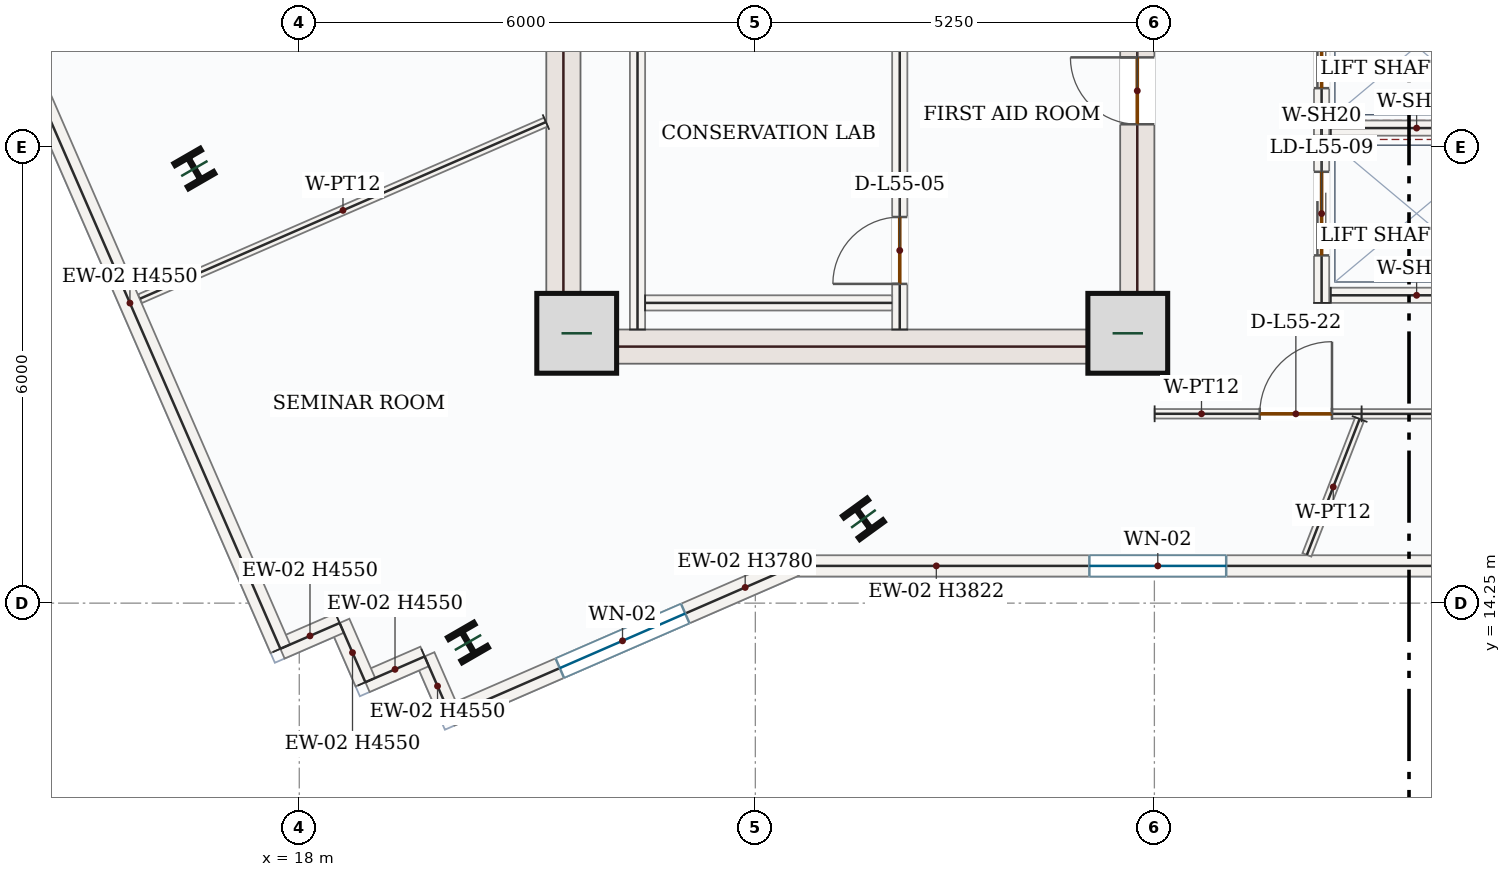
"""IFC4 building model, lengths in metres.
Left out: names, types, materials, properties, quantities, classifications, styles, units other than length and angle.
Written with IfcOpenShell. Run it as: python <this file> out.ifc"""

import sys

from ifc_helpers import new_model, si_unit, direction, frame, frame_2d, origin, origin_2d, place, context, subcontext, project, spatial, rectangle, i_section, extrude, source, transform, mapped, element, fill, save


model = new_model("IFC4")
c1 = context("Model", 3, precision=1e-05, world=origin(), true_north=direction((0.0, 1.0)))
c2 = subcontext(c1, "Body", "Model", "MODEL_VIEW")
j1 = project(units=[si_unit("LENGTHUNIT", "METRE"), si_unit("PLANEANGLEUNIT", "RADIAN")], contexts=[c1])
p1 = place(None, origin())
s1 = spatial("IfcSite", under=j1, at=p1, CompositionType="ELEMENT")
p2 = place(p1, origin())
s2 = spatial("IfcBuilding", under=s1, at=p2, CompositionType="ELEMENT")
p3 = place(p2, frame((0.0, 0.0, 234.3)))
s3 = spatial("IfcBuildingStorey", under=s2, at=p3, CompositionType="ELEMENT", Elevation=234.3)
m1 = source(origin(), c2, "Body", "SweptSolid", [
    extrude(rectangle(XDim=8.55, YDim=0.45, at=frame_2d((4.275, 0.0))), origin(), (0.0, 0.0, 1.0), 4.55),
])
p4 = place(p3, frame((21.475, 17.4, 0.0), z_axis=(0.0, 0.0, 1.0), x_axis=(0.0, 1.0, 0.0)))
e1 = element("IfcWall", 1, at=p4, inside=s3, PredefinedType="SHEAR", context=c2, shape_type="MappedRepresentation", body=[
    mapped(m1, transform((0.0, 0.0, 0.0), x_axis=(1.0, 0.0, 0.0), y_axis=(0.0, 1.0, 0.0), z_axis=(0.0, 0.0, 1.0), scale=1.0)),
])
p5 = place(p3, frame((29.025, 17.4, 0.0), z_axis=(0.0, 0.0, 1.0), x_axis=(0.0, 1.0, 0.0)))
e2 = element("IfcWall", 2, at=p5, inside=s3, PredefinedType="SHEAR", context=c2, shape_type="SweptSolid", body=[
    extrude(rectangle(XDim=8.55, YDim=0.45, at=frame_2d((4.275, 0.0))), origin(), (0.0, 0.0, 1.0), 4.55),
])
p6 = place(p5, frame((6.65, 0.0, 0.0)))
e3 = element("IfcOpeningElement", 3, at=p6, cuts=e2, PredefinedType="OPENING", context=c2, shape_type="SweptSolid", body=[
    extrude(rectangle(XDim=1.1, YDim=2.2, at=frame_2d((0.55, 1.1))), frame((0.0, 0.235, 0.0), z_axis=(0.0, -1.0, 0.0), x_axis=(1.0, 0.0, 0.0)), (0.0, 0.0, 1.0), 0.47),
])
p7 = place(p5, frame((3.15, 0.0, 0.0)))
e4 = element("IfcOpeningElement", 4, at=p7, cuts=e2, PredefinedType="OPENING", context=c2, shape_type="SweptSolid", body=[
    extrude(rectangle(XDim=0.88, YDim=2.1, at=frame_2d((0.44, 1.05))), frame((0.0, 0.235, 0.0), z_axis=(0.0, -1.0, 0.0), x_axis=(1.0, 0.0, 0.0)), (0.0, 0.0, 1.0), 0.47),
])
m2 = source(origin(), c2, "Body", "SweptSolid", [
    extrude(rectangle(XDim=7.1, YDim=0.45, at=frame_2d((3.55, 0.0))), origin(), (0.0, 0.0, 1.0), 4.55),
])
p8 = place(p3, frame((21.7, 17.625, 0.0), z_axis=(0.0, 0.0, 1.0), x_axis=(1.0, 0.0, 0.0)))
e5 = element("IfcWall", 5, at=p8, inside=s3, PredefinedType="SHEAR", context=c2, shape_type="MappedRepresentation", body=[
    mapped(m2, transform((0.0, 0.0, 0.0), x_axis=(1.0, 0.0, 0.0), y_axis=(0.0, 1.0, 0.0), z_axis=(0.0, 0.0, 1.0), scale=1.0)),
])
m3 = source(origin(), c2, "Body", "SweptSolid", [
    extrude(rectangle(XDim=1.05, YDim=1.05, at=origin_2d()), origin(), (0.0, 0.0, 1.0), 4.8),
])
for number, where, z_axis, x_axis in (
    (6, (21.65, 17.8, 0.0), (0.0, 0.0, 1.0), (1.0, 0.0, 0.0)),
    (7, (28.9, 17.8, 0.0), (0.0, 0.0, 1.0), (1.0, 0.0, 0.0)),
):
    element("IfcColumn", number, at=place(p3, frame(where, z_axis=z_axis, x_axis=x_axis)), inside=s3, PredefinedType="COLUMN", context=c2, shape_type="MappedRepresentation", body=[
        mapped(m3, transform((0.0, 0.0, 0.0), x_axis=(1.0, 0.0, 0.0), y_axis=(0.0, 1.0, 0.0), z_axis=(0.0, 0.0, 1.0), scale=1.0)),
    ])
m4 = source(origin(), c2, "Body", "SweptSolid", [
    extrude(i_section(OverallWidth=0.399, OverallDepth=0.386, WebThickness=0.021, FlangeThickness=0.033, FilletRadius=0.018, at=origin_2d()), origin(), (0.0, 0.0, 1.0), 4.8),
])
for number, where, z_axis, x_axis in (
    (8, (25.422, 15.359, 0.0), (0.0, 0.0, 1.0), (0.809, 0.588, 0.0)),
    (9, (16.62, 19.968, 0.0), (0.0, 0.0, 1.0), (0.866, 0.5, 0.0)),
    (10, (20.22, 13.732, 0.0), (0.0, 0.0, 1.0), (0.866, 0.5, 0.0)),
):
    element("IfcColumn", number, at=place(p3, frame(where, z_axis=z_axis, x_axis=x_axis)), inside=s3, PredefinedType="COLUMN", context=c2, shape_type="MappedRepresentation", body=[
        mapped(m4, transform((0.0, 0.0, 0.0), x_axis=(1.0, 0.0, 0.0), y_axis=(0.0, 1.0, 0.0), z_axis=(0.0, 0.0, 1.0), scale=1.0)),
    ])
p9 = place(p3, frame((34.072, 14.74, 0.0), z_axis=(0.0, 0.0, 1.0), x_axis=(-1.0, 0.0, 0.0)))
e11 = element("IfcWall", 11, at=p9, inside=s3, PredefinedType="SOLIDWALL", context=c2, shape_type="SweptSolid", body=[
    extrude(rectangle(XDim=9.554, YDim=0.28, at=frame_2d((4.777, 0.0))), origin(), (0.0, 0.0, 1.0), 3.822),
])
p10 = place(p9, frame((3.877, 0.0, 0.85)))
e12 = element("IfcOpeningElement", 12, at=p10, cuts=e11, PredefinedType="OPENING", context=c2, shape_type="SweptSolid", body=[
    extrude(rectangle(XDim=1.8, YDim=1.75, at=frame_2d((0.9, 0.875))), frame((0.0, 0.15, 0.0), z_axis=(0.0, -1.0, 0.0), x_axis=(1.0, 0.0, 0.0)), (0.0, 0.0, 1.0), 0.3),
])
p11 = place(p3, frame((24.518, 14.74, 0.0), z_axis=(0.0, 0.0, 1.0), x_axis=(-0.916937202251, -0.399031536509, 0.0)))
e13 = element("IfcWall", 13, at=p11, inside=s3, PredefinedType="SOLIDWALL", context=c2, shape_type="SweptSolid", body=[
    extrude(rectangle(XDim=4.939, YDim=0.28, at=frame_2d((2.47, 0.0))), origin(), (0.0, 0.0, 1.0), 3.78),
])
p12 = place(p11, frame((1.57, 0.0, 0.85)))
e14 = element("IfcOpeningElement", 14, at=p12, cuts=e13, PredefinedType="OPENING", context=c2, shape_type="SweptSolid", body=[
    extrude(rectangle(XDim=1.8, YDim=1.75, at=frame_2d((0.9, 0.875))), frame((0.0, 0.15, 0.0), z_axis=(0.0, -1.0, 0.0), x_axis=(1.0, 0.0, 0.0)), (0.0, 0.0, 1.0), 0.3),
])
m5 = source(origin(), c2, "Body", "SweptSolid", [
    extrude(rectangle(XDim=0.85, YDim=0.28, at=frame_2d((0.425, 0.0))), origin(), (0.0, 0.0, 1.0), 4.55),
])
for number, where, z_axis, x_axis in (
    (15, (19.989, 12.769, 0.0), (0.0, 0.0, 1.0), (-0.399, 0.917, 0.0)),
    (16, (19.649, 13.549, 0.0), (0.0, 0.0, 1.0), (-0.917, -0.399, 0.0)),
):
    element("IfcWall", number, at=place(p3, frame(where, z_axis=z_axis, x_axis=x_axis)), inside=s3, PredefinedType="SOLIDWALL", context=c2, shape_type="MappedRepresentation", body=[
        mapped(m5, transform((0.0, 0.0, 0.0), x_axis=(1.0, 0.0, 0.0), y_axis=(0.0, 1.0, 0.0), z_axis=(0.0, 0.0, 1.0), scale=1.0)),
    ])
m6 = source(origin(), c2, "Body", "SweptSolid", [
    extrude(rectangle(XDim=0.85, YDim=0.28, at=frame_2d((0.425, 0.0))), origin(), (0.0, 0.0, 1.0), 4.55),
])
p13 = place(p3, frame((18.87, 13.209, 0.0), z_axis=(0.0, 0.0, 1.0), x_axis=(-0.399009702756, 0.916946703526, 0.0)))
e17 = element("IfcWall", 17, at=p13, inside=s3, PredefinedType="SOLIDWALL", context=c2, shape_type="MappedRepresentation", body=[
    mapped(m6, transform((0.0, 0.0, 0.0), x_axis=(1.0, 0.0, 0.0), y_axis=(0.0, 1.0, 0.0), z_axis=(0.0, 0.0, 1.0), scale=1.0)),
])
p14 = place(p3, frame((18.531, 13.989, 0.0), z_axis=(0.0, 0.0, 1.0), x_axis=(-0.916992420403, -0.398904626351, 0.0)))
e18 = element("IfcWall", 18, at=p14, inside=s3, PredefinedType="SOLIDWALL", context=c2, shape_type="MappedRepresentation", body=[
    mapped(m5, transform((0.0, 0.0, 0.0), x_axis=(1.0, 0.0, 0.0), y_axis=(0.0, 1.0, 0.0), z_axis=(0.0, 0.0, 1.0), scale=1.0)),
])
m7 = source(origin(), c2, "Body", "SweptSolid", [
    extrude(rectangle(XDim=9.92, YDim=0.28, at=frame_2d((4.96, 0.0))), origin(), (0.0, 0.0, 1.0), 4.55),
])
p15 = place(p3, frame((17.751, 13.65, 0.0), z_axis=(0.0, 0.0, 1.0), x_axis=(-0.398992471769, 0.916954201404, 0.0)))
e19 = element("IfcWall", 19, at=p15, inside=s3, PredefinedType="SOLIDWALL", context=c2, shape_type="MappedRepresentation", body=[
    mapped(m7, transform((0.0, 0.0, 0.0), x_axis=(1.0, 0.0, 0.0), y_axis=(0.0, 1.0, 0.0), z_axis=(0.0, 0.0, 1.0), scale=1.0)),
])
m8 = source(origin(), c2, "Body", "SweptSolid", [
    extrude(rectangle(XDim=7.87, YDim=0.2, at=frame_2d((3.935, 0.0))), origin(), (0.0, 0.0, 1.0), 4.55),
])
p16 = place(p3, frame((22.45, 17.85, 0.0), z_axis=(0.0, 0.0, 1.0), x_axis=(0.0, 1.0, 0.0)))
e20 = element("IfcWall", 20, at=p16, inside=s3, PredefinedType="SOLIDWALL", context=c2, shape_type="MappedRepresentation", body=[
    mapped(m8, transform((0.0, 0.0, 0.0), x_axis=(1.0, 0.0, 0.0), y_axis=(0.0, 1.0, 0.0), z_axis=(0.0, 0.0, 1.0), scale=1.0)),
])
p17 = place(p3, frame((25.9, 17.85, 0.0), z_axis=(0.0, 0.0, 1.0), x_axis=(0.0, 1.0, 0.0)))
e21 = element("IfcWall", 21, at=p17, inside=s3, PredefinedType="SOLIDWALL", context=c2, shape_type="SweptSolid", body=[
    extrude(rectangle(XDim=8.0, YDim=0.2, at=frame_2d((4.0, 0.0))), origin(), (0.0, 0.0, 1.0), 4.55),
])
p18 = place(p17, frame((6.2, 0.0, 0.0)))
e22 = element("IfcOpeningElement", 22, at=p18, cuts=e21, PredefinedType="OPENING", context=c2, shape_type="SweptSolid", body=[
    extrude(rectangle(XDim=1.0, YDim=2.15, at=frame_2d((0.5, 1.075))), frame((0.0, 0.11, 0.0), z_axis=(0.0, -1.0, 0.0), x_axis=(1.0, 0.0, 0.0)), (0.0, 0.0, 1.0), 0.22),
])
p19 = place(p17, frame((0.6, 0.0, 0.0)))
e23 = element("IfcOpeningElement", 23, at=p19, cuts=e21, PredefinedType="OPENING", context=c2, shape_type="SweptSolid", body=[
    extrude(rectangle(XDim=0.88, YDim=2.1, at=frame_2d((0.44, 1.05))), frame((0.0, 0.11, 0.0), z_axis=(0.0, -1.0, 0.0), x_axis=(1.0, 0.0, 0.0)), (0.0, 0.0, 1.0), 0.22),
])
m9 = source(origin(), c2, "Body", "SweptSolid", [
    extrude(rectangle(XDim=3.25, YDim=0.2, at=frame_2d((1.625, 0.0))), origin(), (0.0, 0.0, 1.0), 4.55),
])
p20 = place(p3, frame((22.55, 18.2, 0.0), z_axis=(0.0, 0.0, 1.0), x_axis=(1.0, 0.0, 0.0)))
e24 = element("IfcWall", 24, at=p20, inside=s3, PredefinedType="SOLIDWALL", context=c2, shape_type="MappedRepresentation", body=[
    mapped(m9, transform((0.0, 0.0, 0.0), x_axis=(1.0, 0.0, 0.0), y_axis=(0.0, 1.0, 0.0), z_axis=(0.0, 0.0, 1.0), scale=1.0)),
])
p21 = place(p3, frame((31.45, 20.4, 0.0), z_axis=(0.0, 0.0, 1.0), x_axis=(0.0, 1.0, 0.0)))
e25 = element("IfcWall", 25, at=p21, inside=s3, PredefinedType="SOLIDWALL", context=c2, shape_type="SweptSolid", body=[
    extrude(rectangle(XDim=2.35, YDim=0.2, at=frame_2d((1.175, 0.0))), origin(), (0.0, 0.0, 1.0), 4.55),
])
p22 = place(p21, frame((0.625, 0.0, 0.0)))
e26 = element("IfcOpeningElement", 26, at=p22, cuts=e25, PredefinedType="OPENING", context=c2, shape_type="SweptSolid", body=[
    extrude(rectangle(XDim=1.1, YDim=2.15, at=frame_2d((0.55, 1.075))), frame((0.0, 0.11, 0.0), z_axis=(0.0, -1.0, 0.0), x_axis=(1.0, 0.0, 0.0)), (0.0, 0.0, 1.0), 0.22),
])
m10 = source(origin(), c2, "Body", "SweptSolid", [
    extrude(rectangle(XDim=2.26, YDim=0.2, at=frame_2d((1.13, 0.0))), origin(), (0.0, 0.0, 1.0), 4.55),
])
p23 = place(p3, frame((31.57, 20.5, 0.0), z_axis=(0.0, 0.0, 1.0), x_axis=(1.0, 0.0, 0.0)))
e27 = element("IfcWall", 27, at=p23, inside=s3, PredefinedType="SOLIDWALL", context=c2, shape_type="MappedRepresentation", body=[
    mapped(m10, transform((0.0, 0.0, 0.0), x_axis=(1.0, 0.0, 0.0), y_axis=(0.0, 1.0, 0.0), z_axis=(0.0, 0.0, 1.0), scale=1.0)),
])
p24 = place(p3, frame((31.45, 18.2, 0.0), z_axis=(0.0, 0.0, 1.0), x_axis=(0.0, 1.0, 0.0)))
e28 = element("IfcWall", 28, at=p24, inside=s3, PredefinedType="SOLIDWALL", context=c2, shape_type="SweptSolid", body=[
    extrude(rectangle(XDim=2.35, YDim=0.2, at=frame_2d((1.175, 0.0))), origin(), (0.0, 0.0, 1.0), 4.55),
])
p25 = place(p24, frame((0.625, 0.0, 0.0)))
e29 = element("IfcOpeningElement", 29, at=p25, cuts=e28, PredefinedType="OPENING", context=c2, shape_type="SweptSolid", body=[
    extrude(rectangle(XDim=1.1, YDim=2.15, at=frame_2d((0.55, 1.075))), frame((0.0, 0.11, 0.0), z_axis=(0.0, -1.0, 0.0), x_axis=(1.0, 0.0, 0.0)), (0.0, 0.0, 1.0), 0.22),
])
p26 = place(p3, frame((31.57, 18.3, 0.0), z_axis=(0.0, 0.0, 1.0), x_axis=(1.0, 0.0, 0.0)))
e30 = element("IfcWall", 30, at=p26, inside=s3, PredefinedType="SOLIDWALL", context=c2, shape_type="MappedRepresentation", body=[
    mapped(m10, transform((0.0, 0.0, 0.0), x_axis=(1.0, 0.0, 0.0), y_axis=(0.0, 1.0, 0.0), z_axis=(0.0, 0.0, 1.0), scale=1.0)),
])
m11 = source(origin(), c2, "Body", "SweptSolid", [
    extrude(rectangle(XDim=5.823, YDim=0.125, at=frame_2d((2.912, 0.0))), origin(), (0.0, 0.0, 1.0), 4.55),
])
p27 = place(p3, frame((21.245, 20.579, 0.0), z_axis=(0.0, 0.0, 1.0), x_axis=(-0.916956044868, -0.398988235141, 0.0)))
e31 = element("IfcWall", 31, at=p27, inside=s3, PredefinedType="PARTITIONING", context=c2, shape_type="MappedRepresentation", body=[
    mapped(m11, transform((0.0, 0.0, 0.0), x_axis=(1.0, 0.0, 0.0), y_axis=(0.0, 1.0, 0.0), z_axis=(0.0, 0.0, 1.0), scale=1.0)),
])
p28 = place(p3, frame((29.253, 16.741, 0.0), z_axis=(0.0, 0.0, 1.0), x_axis=(0.999999899509, -0.000448309827, 0.0)))
e32 = element("IfcWall", 32, at=p28, inside=s3, PredefinedType="PARTITIONING", context=c2, shape_type="SweptSolid", body=[
    extrude(rectangle(XDim=2.723, YDim=0.125, at=frame_2d((1.361, 0.0))), origin(), (0.0, 0.0, 1.0), 4.55),
])
p29 = place(p28, frame((1.383, 0.0, 0.0)))
e33 = element("IfcOpeningElement", 33, at=p29, cuts=e32, PredefinedType="OPENING", context=c2, shape_type="SweptSolid", body=[
    extrude(rectangle(XDim=0.95, YDim=2.15, at=frame_2d((0.475, 1.075))), frame((0.0, 0.073, 0.0), z_axis=(0.0, -1.0, 0.0), x_axis=(1.0, 0.0, 0.0)), (0.0, 0.0, 1.0), 0.145),
])
m12 = source(origin(), c2, "Body", "SweptSolid", [
    extrude(rectangle(XDim=1.917, YDim=0.125, at=frame_2d((0.959, 0.0))), origin(), (0.0, 0.0, 1.0), 4.55),
])
p30 = place(p3, frame((31.95, 16.673, 0.0), z_axis=(0.0, 0.0, 1.0), x_axis=(-0.361844059872, -0.932238637011, 0.0)))
e34 = element("IfcWall", 34, at=p30, inside=s3, PredefinedType="PARTITIONING", context=c2, shape_type="MappedRepresentation", body=[
    mapped(m12, transform((0.0, 0.0, 0.0), x_axis=(1.0, 0.0, 0.0), y_axis=(0.0, 1.0, 0.0), z_axis=(0.0, 0.0, 1.0), scale=1.0)),
])
p31 = place(p3, frame((31.976, 16.74, 0.0), z_axis=(0.0, 0.0, 1.0), x_axis=(1.0, 0.0, 0.0)))
e35 = element("IfcWall", 35, at=p31, inside=s3, PredefinedType="PARTITIONING", context=c2, shape_type="SweptSolid", body=[
    extrude(rectangle(XDim=8.488, YDim=0.125, at=frame_2d((4.244, 0.0))), origin(), (0.0, 0.0, 1.0), 4.55),
])
p32 = place(p31, frame((3.769, 0.0, 0.0)))
e36 = element("IfcOpeningElement", 36, at=p32, cuts=e35, PredefinedType="OPENING", context=c2, shape_type="SweptSolid", body=[
    extrude(rectangle(XDim=0.95, YDim=2.15, at=frame_2d((0.475, 1.075))), frame((0.0, 0.073, 0.0), z_axis=(0.0, -1.0, 0.0), x_axis=(1.0, 0.0, 0.0)), (0.0, 0.0, 1.0), 0.145),
])
m13 = source(origin(), c2, "Body", "SweptSolid", [
    extrude(rectangle(XDim=1.8, YDim=1.75, at=frame_2d((0.9, 0.875))), frame((0.0, 0.03, 0.0), z_axis=(0.0, -1.0, 0.0), x_axis=(1.0, 0.0, 0.0)), (0.0, 0.0, 1.0), 0.06),
])
p33 = place(p10, origin())
e37 = element("IfcWindow", 37, at=p33, inside=s3, PartitioningType="DOUBLE_PANEL_VERTICAL", PredefinedType="WINDOW", context=c2, shape_type="MappedRepresentation", body=[
    mapped(m13, transform((0.0, 0.0, 0.0), x_axis=(1.0, 0.0, 0.0), y_axis=(0.0, 1.0, 0.0), z_axis=(0.0, 0.0, 1.0), scale=1.0)),
])
fill(e12, e37)
p34 = place(p12, origin())
e38 = element("IfcWindow", 38, at=p34, inside=s3, PartitioningType="DOUBLE_PANEL_VERTICAL", PredefinedType="WINDOW", context=c2, shape_type="MappedRepresentation", body=[
    mapped(m13, transform((0.0, 0.0, 0.0), x_axis=(1.0, 0.0, 0.0), y_axis=(0.0, 1.0, 0.0), z_axis=(0.0, 0.0, 1.0), scale=1.0)),
])
fill(e14, e38)
m14 = source(origin(), c2, "Body", "SweptSolid", [
    extrude(rectangle(XDim=0.88, YDim=2.1, at=frame_2d((0.44, 1.05))), frame((0.0, 0.025, 0.0), z_axis=(0.0, -1.0, 0.0), x_axis=(1.0, 0.0, 0.0)), (0.0, 0.0, 1.0), 0.05),
])
p35 = place(p19, origin())
e39 = element("IfcDoor", 39, at=p35, inside=s3, OperationType="SINGLE_SWING_LEFT", PredefinedType="DOOR", context=c2, shape_type="MappedRepresentation", body=[
    mapped(m14, transform((0.0, 0.0, 0.0), x_axis=(1.0, 0.0, 0.0), y_axis=(0.0, 1.0, 0.0), z_axis=(0.0, 0.0, 1.0), scale=1.0)),
])
fill(e23, e39)
p36 = place(p7, origin())
e40 = element("IfcDoor", 40, at=p36, inside=s3, OperationType="SINGLE_SWING_RIGHT", PredefinedType="DOOR", context=c2, shape_type="MappedRepresentation", body=[
    mapped(m14, transform((0.0, 0.0, 0.0), x_axis=(1.0, 0.0, 0.0), y_axis=(0.0, 1.0, 0.0), z_axis=(0.0, 0.0, 1.0), scale=1.0)),
])
fill(e4, e40)
m15 = source(origin(), c2, "Body", "SweptSolid", [
    extrude(rectangle(XDim=1.1, YDim=2.15, at=frame_2d((0.55, 1.075))), frame((0.0, 0.025, 0.0), z_axis=(0.0, -1.0, 0.0), x_axis=(1.0, 0.0, 0.0)), (0.0, 0.0, 1.0), 0.05),
])
p37 = place(p22, origin())
e41 = element("IfcDoor", 41, at=p37, inside=s3, OperationType="DOUBLE_DOOR_SLIDING", PredefinedType="DOOR", context=c2, shape_type="MappedRepresentation", body=[
    mapped(m15, transform((0.0, 0.0, 0.0), x_axis=(1.0, 0.0, 0.0), y_axis=(0.0, 1.0, 0.0), z_axis=(0.0, 0.0, 1.0), scale=1.0)),
])
fill(e26, e41)
p38 = place(p25, origin())
e42 = element("IfcDoor", 42, at=p38, inside=s3, OperationType="DOUBLE_DOOR_SLIDING", PredefinedType="DOOR", context=c2, shape_type="MappedRepresentation", body=[
    mapped(m15, transform((0.0, 0.0, 0.0), x_axis=(1.0, 0.0, 0.0), y_axis=(0.0, 1.0, 0.0), z_axis=(0.0, 0.0, 1.0), scale=1.0)),
])
fill(e29, e42)
m16 = source(origin(), c2, "Body", "SweptSolid", [
    extrude(rectangle(XDim=0.95, YDim=2.15, at=frame_2d((0.475, 1.075))), frame((0.0, 0.025, 0.0), z_axis=(0.0, -1.0, 0.0), x_axis=(1.0, 0.0, 0.0)), (0.0, 0.0, 1.0), 0.05),
])
p39 = place(p29, origin())
e43 = element("IfcDoor", 43, at=p39, inside=s3, OperationType="SINGLE_SWING_RIGHT", PredefinedType="DOOR", context=c2, shape_type="MappedRepresentation", body=[
    mapped(m16, transform((0.0, 0.0, 0.0), x_axis=(1.0, 0.0, 0.0), y_axis=(0.0, 1.0, 0.0), z_axis=(0.0, 0.0, 1.0), scale=1.0)),
])
fill(e33, e43)
save(model, sys.argv[1])
